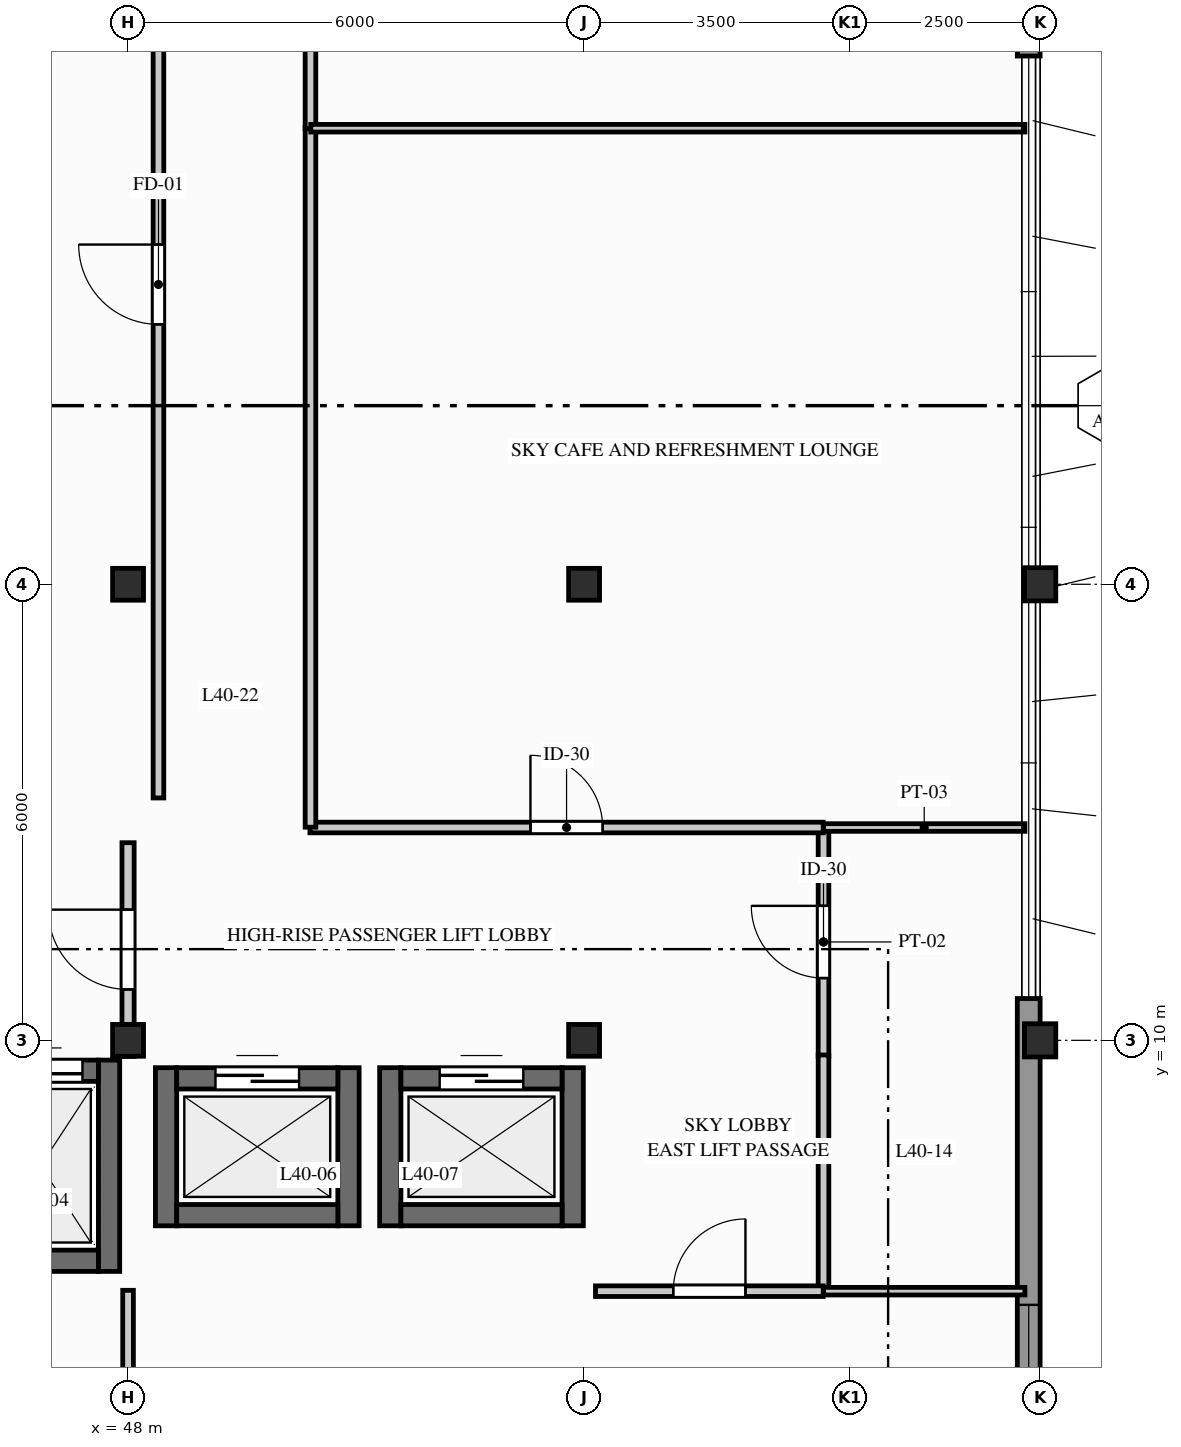
"""IFC4 building model, lengths in metres.
Left out: names, types, materials, properties, quantities, classifications, styles, units other than length and angle.
Written with IfcOpenShell. Run it as: python <this file> out.ifc"""

import sys

from ifc_helpers import new_model, si_unit, direction, frame, frame_2d, origin, origin_2d, place, context, subcontext, project, spatial, rectangle, i_section, extrude, element, fill, save


model = new_model("IFC4")
c1 = context("Model", 3, precision=1e-05, world=origin(), true_north=direction((0.0, 1.0)))
c2 = subcontext(c1, "Body", "Model", "MODEL_VIEW")
j1 = project(units=[si_unit("LENGTHUNIT", "METRE"), si_unit("PLANEANGLEUNIT", "RADIAN")], contexts=[c1])
p1 = place(None, origin())
s1 = spatial("IfcSite", under=j1, at=p1, CompositionType="ELEMENT")
p2 = place(p1, origin())
s2 = spatial("IfcBuilding", under=s1, at=p2, CompositionType="ELEMENT")
p3 = place(p2, frame((0.0, 0.0, 134.5)))
s3 = spatial("IfcBuildingStorey", under=s2, at=p3, CompositionType="ELEMENT", Elevation=134.5)
for number, where, z_axis, x_axis in (
    (1, (48.0, 10.0, 0.0), (0.0, 0.0, 1.0), (1.0, 0.0, 0.0)),
    (2, (48.0, 16.0, 0.0), (0.0, 0.0, 1.0), (1.0, 0.0, 0.0)),
    (3, (54.0, 10.0, 0.0), (0.0, 0.0, 1.0), (1.0, 0.0, 0.0)),
    (4, (54.0, 16.0, 0.0), (0.0, 0.0, 1.0), (1.0, 0.0, 0.0)),
):
    element("IfcColumn", number, at=place(p3, frame(where, z_axis=z_axis, x_axis=x_axis)), inside=s3, PredefinedType="COLUMN", context=c2, shape_type="SweptSolid", body=[
        extrude(i_section(OverallWidth=0.407, OverallDepth=0.419, WebThickness=0.031, FlangeThickness=0.049, FilletRadius=0.015, at=origin_2d()), origin(), (0.0, 0.0, 1.0), 4.2),
    ])
for number, where, z_axis, x_axis in (
    (5, (60.0, 10.0, 0.0), (0.0, 0.0, 1.0), (1.0, 0.0, 0.0)),
    (6, (60.0, 16.0, 0.0), (0.0, 0.0, 1.0), (1.0, 0.0, 0.0)),
):
    element("IfcColumn", number, at=place(p3, frame(where, z_axis=z_axis, x_axis=x_axis)), inside=s3, PredefinedType="COLUMN", context=c2, shape_type="SweptSolid", body=[
        extrude(i_section(OverallWidth=0.412, OverallDepth=0.437, WebThickness=0.036, FlangeThickness=0.058, FilletRadius=0.015, at=origin_2d()), origin(), (0.0, 0.0, 1.0), 4.2),
    ])
p4 = place(p3, frame((59.85, 2.5, 0.0), z_axis=(0.0, 0.0, 1.0), x_axis=(0.0, 1.0, 0.0)))
e7 = element("IfcWall", 7, at=p4, inside=s3, PredefinedType="STANDARD", context=c2, shape_type="SweptSolid", body=[
    extrude(rectangle(XDim=8.05, YDim=0.3, at=frame_2d((4.025, 0.0))), origin(), (0.0, 0.0, 1.0), 3.98),
])
p5 = place(p4, frame((2.52, 0.0, 0.95)))
e8 = element("IfcOpeningElement", 8, at=p5, cuts=e7, PredefinedType="OPENING", context=c2, shape_type="SweptSolid", body=[
    extrude(rectangle(XDim=1.5, YDim=1.8, at=frame_2d((0.75, 0.9))), frame((0.0, 0.16, 0.0), z_axis=(0.0, -1.0, 0.0), x_axis=(1.0, 0.0, 0.0)), (0.0, 0.0, 1.0), 0.32),
])
p6 = place(p3, frame((59.85, 22.95, 0.0), z_axis=(0.0, 0.0, 1.0), x_axis=(0.0, 1.0, 0.0)))
e9 = element("IfcWall", 9, at=p6, inside=s3, PredefinedType="STANDARD", context=c2, shape_type="SweptSolid", body=[
    extrude(rectangle(XDim=5.55, YDim=0.3, at=frame_2d((2.775, 0.0))), origin(), (0.0, 0.0, 1.0), 3.422),
])
p7 = place(p3, frame((47.75, 6.96, 0.0), z_axis=(0.0, 0.0, 1.0), x_axis=(0.0, 1.0, 0.0)))
e10 = element("IfcWall", 10, at=p7, inside=s3, PredefinedType="SHEAR", context=c2, shape_type="SweptSolid", body=[
    extrude(rectangle(XDim=2.78, YDim=0.28, at=frame_2d((1.39, 0.0))), origin(), (0.0, 0.0, 1.0), 3.98),
])
p8 = place(p3, frame((46.09, 7.1, 0.0), z_axis=(0.0, 0.0, 1.0), x_axis=(1.0, 0.0, 0.0)))
e11 = element("IfcWall", 11, at=p8, inside=s3, PredefinedType="SHEAR", context=c2, shape_type="SweptSolid", body=[
    extrude(rectangle(XDim=1.52, YDim=0.28, at=frame_2d((0.76, 0.0))), origin(), (0.0, 0.0, 1.0), 3.98),
])
p9 = place(p3, frame((46.09, 9.6, 0.0), z_axis=(0.0, 0.0, 1.0), x_axis=(1.0, 0.0, 0.0)))
e12 = element("IfcWall", 12, at=p9, inside=s3, PredefinedType="SHEAR", context=c2, shape_type="SweptSolid", body=[
    extrude(rectangle(XDim=1.52, YDim=0.28, at=frame_2d((0.76, 0.0))), origin(), (0.0, 0.0, 1.0), 3.98),
])
p10 = place(p9, frame((0.21, 0.0, 0.0)))
e13 = element("IfcOpeningElement", 13, at=p10, cuts=e12, PredefinedType="OPENING", context=c2, shape_type="SweptSolid", body=[
    extrude(rectangle(XDim=1.1, YDim=2.06, at=frame_2d((0.55, 1.03))), frame((0.0, 0.15, 0.0), z_axis=(0.0, -1.0, 0.0), x_axis=(1.0, 0.0, 0.0)), (0.0, 0.0, 1.0), 0.3),
])
for number, where, z_axis, x_axis in (
    (14, (48.5, 7.56, 0.0), (0.0, 0.0, 1.0), (0.0, 1.0, 0.0)),
    (15, (50.9, 7.56, 0.0), (0.0, 0.0, 1.0), (0.0, 1.0, 0.0)),
):
    element("IfcWall", number, at=place(p3, frame(where, z_axis=z_axis, x_axis=x_axis)), inside=s3, PredefinedType="SHEAR", context=c2, shape_type="SweptSolid", body=[
        extrude(rectangle(XDim=2.08, YDim=0.28, at=frame_2d((1.04, 0.0))), origin(), (0.0, 0.0, 1.0), 3.98),
    ])
p11 = place(p3, frame((48.64, 7.7, 0.0), z_axis=(0.0, 0.0, 1.0), x_axis=(1.0, 0.0, 0.0)))
e16 = element("IfcWall", 16, at=p11, inside=s3, PredefinedType="SHEAR", context=c2, shape_type="SweptSolid", body=[
    extrude(rectangle(XDim=2.12, YDim=0.28, at=frame_2d((1.06, 0.0))), origin(), (0.0, 0.0, 1.0), 3.98),
])
p12 = place(p3, frame((48.64, 9.5, 0.0), z_axis=(0.0, 0.0, 1.0), x_axis=(1.0, 0.0, 0.0)))
e17 = element("IfcWall", 17, at=p12, inside=s3, PredefinedType="SHEAR", context=c2, shape_type="SweptSolid", body=[
    extrude(rectangle(XDim=2.12, YDim=0.28, at=frame_2d((1.06, 0.0))), origin(), (0.0, 0.0, 1.0), 3.98),
])
p13 = place(p12, frame((0.51, 0.0, 0.0)))
e18 = element("IfcOpeningElement", 18, at=p13, cuts=e17, PredefinedType="OPENING", context=c2, shape_type="SweptSolid", body=[
    extrude(rectangle(XDim=1.1, YDim=2.06, at=frame_2d((0.55, 1.03))), frame((0.0, 0.15, 0.0), z_axis=(0.0, -1.0, 0.0), x_axis=(1.0, 0.0, 0.0)), (0.0, 0.0, 1.0), 0.3),
])
for number, where, z_axis, x_axis in (
    (19, (51.45, 7.56, 0.0), (0.0, 0.0, 1.0), (0.0, 1.0, 0.0)),
    (20, (53.85, 7.56, 0.0), (0.0, 0.0, 1.0), (0.0, 1.0, 0.0)),
):
    element("IfcWall", number, at=place(p3, frame(where, z_axis=z_axis, x_axis=x_axis)), inside=s3, PredefinedType="SHEAR", context=c2, shape_type="SweptSolid", body=[
        extrude(rectangle(XDim=2.08, YDim=0.28, at=frame_2d((1.04, 0.0))), origin(), (0.0, 0.0, 1.0), 3.98),
    ])
p14 = place(p3, frame((51.59, 7.7, 0.0), z_axis=(0.0, 0.0, 1.0), x_axis=(1.0, 0.0, 0.0)))
e21 = element("IfcWall", 21, at=p14, inside=s3, PredefinedType="SHEAR", context=c2, shape_type="SweptSolid", body=[
    extrude(rectangle(XDim=2.12, YDim=0.28, at=frame_2d((1.06, 0.0))), origin(), (0.0, 0.0, 1.0), 3.98),
])
p15 = place(p3, frame((51.59, 9.5, 0.0), z_axis=(0.0, 0.0, 1.0), x_axis=(1.0, 0.0, 0.0)))
e22 = element("IfcWall", 22, at=p15, inside=s3, PredefinedType="SHEAR", context=c2, shape_type="SweptSolid", body=[
    extrude(rectangle(XDim=2.12, YDim=0.28, at=frame_2d((1.06, 0.0))), origin(), (0.0, 0.0, 1.0), 3.98),
])
p16 = place(p15, frame((0.51, 0.0, 0.0)))
e23 = element("IfcOpeningElement", 23, at=p16, cuts=e22, PredefinedType="OPENING", context=c2, shape_type="SweptSolid", body=[
    extrude(rectangle(XDim=1.1, YDim=2.06, at=frame_2d((0.55, 1.03))), frame((0.0, 0.15, 0.0), z_axis=(0.0, -1.0, 0.0), x_axis=(1.0, 0.0, 0.0)), (0.0, 0.0, 1.0), 0.3),
])
p17 = place(p3, frame((48.0, 3.15, 0.0), z_axis=(0.0, 0.0, 1.0), x_axis=(0.0, 1.0, 0.0)))
e24 = element("IfcWall", 24, at=p17, inside=s3, PredefinedType="PARTITIONING", context=c2, shape_type="SweptSolid", body=[
    extrude(rectangle(XDim=3.561, YDim=0.14, at=frame_2d((1.781, 0.0))), origin(), (0.0, 0.0, 1.0), 3.343),
])
p18 = place(p17, frame((1.371, 0.0, 0.0)))
e25 = element("IfcOpeningElement", 25, at=p18, cuts=e24, PredefinedType="OPENING", context=c2, shape_type="SweptSolid", body=[
    extrude(rectangle(XDim=0.82, YDim=2.02, at=frame_2d((0.41, 1.01))), frame((0.0, 0.08, 0.0), z_axis=(0.0, -1.0, 0.0), x_axis=(1.0, 0.0, 0.0)), (0.0, 0.0, 1.0), 0.16),
])
p19 = place(p3, frame((57.15, 9.789, 0.0), z_axis=(0.0, 0.0, 1.0), x_axis=(0.0, 1.0, 0.0)))
e26 = element("IfcWall", 26, at=p19, inside=s3, PredefinedType="PARTITIONING", context=c2, shape_type="SweptSolid", body=[
    extrude(rectangle(XDim=3.011, YDim=0.14, at=frame_2d((1.506, 0.0))), origin(), (0.0, 0.0, 1.0), 3.343),
])
p20 = place(p19, frame((1.031, 0.0, 0.0)))
e27 = element("IfcOpeningElement", 27, at=p20, cuts=e26, PredefinedType="OPENING", context=c2, shape_type="SweptSolid", body=[
    extrude(rectangle(XDim=0.95, YDim=2.05, at=frame_2d((0.475, 1.025))), frame((0.0, 0.08, 0.0), z_axis=(0.0, -1.0, 0.0), x_axis=(1.0, 0.0, 0.0)), (0.0, 0.0, 1.0), 0.16),
])
p21 = place(p3, frame((57.15, 12.8, 0.0), z_axis=(0.0, 0.0, 1.0), x_axis=(1.0, 0.0, 0.0)))
e28 = element("IfcWall", 28, at=p21, inside=s3, PredefinedType="PARTITIONING", context=c2, shape_type="SweptSolid", body=[
    extrude(rectangle(XDim=2.65, YDim=0.1, at=frame_2d((1.325, 0.0))), origin(), (0.0, 0.0, 1.0), 3.98),
])
p22 = place(p3, frame((57.15, 6.7, 0.0), z_axis=(0.0, 0.0, 1.0), x_axis=(0.0, 1.0, 0.0)))
e29 = element("IfcWall", 29, at=p22, inside=s3, PredefinedType="PARTITIONING", context=c2, shape_type="SweptSolid", body=[
    extrude(rectangle(XDim=3.107, YDim=0.14, at=frame_2d((1.554, 0.0))), origin(), (0.0, 0.0, 1.0), 3.98),
])
p23 = place(p3, frame((57.15, 6.7, 0.0), z_axis=(0.0, 0.0, 1.0), x_axis=(1.0, 0.0, 0.0)))
e30 = element("IfcWall", 30, at=p23, inside=s3, PredefinedType="PARTITIONING", context=c2, shape_type="SweptSolid", body=[
    extrude(rectangle(XDim=2.65, YDim=0.1, at=frame_2d((1.325, 0.0))), origin(), (0.0, 0.0, 1.0), 3.98),
])
p24 = place(p3, frame((48.0, 9.789, 0.0), z_axis=(0.0, 0.0, 1.0), x_axis=(0.0, 1.0, 0.0)))
e31 = element("IfcWall", 31, at=p24, inside=s3, PredefinedType="PARTITIONING", context=c2, shape_type="SweptSolid", body=[
    extrude(rectangle(XDim=2.811, YDim=0.16, at=frame_2d((1.406, 0.0))), origin(), (0.0, 0.0, 1.0), 3.343),
])
p25 = place(p24, frame((0.881, 0.0, 0.0)))
e32 = element("IfcOpeningElement", 32, at=p25, cuts=e31, PredefinedType="OPENING", context=c2, shape_type="SweptSolid", body=[
    extrude(rectangle(XDim=1.05, YDim=2.06, at=frame_2d((0.525, 1.03))), frame((0.0, 0.09, 0.0), z_axis=(0.0, -1.0, 0.0), x_axis=(1.0, 0.0, 0.0)), (0.0, 0.0, 1.0), 0.18),
])
p26 = place(p3, frame((50.393, 12.8, 0.0), z_axis=(0.0, 0.0, 1.0), x_axis=(1.0, 0.0, 0.0)))
e33 = element("IfcWall", 33, at=p26, inside=s3, PredefinedType="PARTITIONING", context=c2, shape_type="SweptSolid", body=[
    extrude(rectangle(XDim=6.753, YDim=0.14, at=frame_2d((3.377, 0.0))), origin(), (0.0, 0.0, 1.0), 3.343),
])
p27 = place(p26, frame((2.902, 0.0, 0.0)))
e34 = element("IfcOpeningElement", 34, at=p27, cuts=e33, PredefinedType="OPENING", context=c2, shape_type="SweptSolid", body=[
    extrude(rectangle(XDim=0.95, YDim=2.05, at=frame_2d((0.475, 1.025))), frame((0.0, 0.08, 0.0), z_axis=(0.0, -1.0, 0.0), x_axis=(1.0, 0.0, 0.0)), (0.0, 0.0, 1.0), 0.16),
])
p28 = place(p3, frame((48.4, 13.189, 0.0), z_axis=(0.0, 0.0, 1.0), x_axis=(0.0, 1.0, 0.0)))
e35 = element("IfcWall", 35, at=p28, inside=s3, PredefinedType="PARTITIONING", context=c2, shape_type="SweptSolid", body=[
    extrude(rectangle(XDim=13.511, YDim=0.14, at=frame_2d((6.756, 0.0))), origin(), (0.0, 0.0, 1.0), 3.343),
])
p29 = place(p28, frame((6.231, 0.0, 0.0)))
e36 = element("IfcOpeningElement", 36, at=p29, cuts=e35, PredefinedType="OPENING", context=c2, shape_type="SweptSolid", body=[
    extrude(rectangle(XDim=1.05, YDim=2.06, at=frame_2d((0.525, 1.03))), frame((0.0, 0.08, 0.0), z_axis=(0.0, -1.0, 0.0), x_axis=(1.0, 0.0, 0.0)), (0.0, 0.0, 1.0), 0.16),
])
p30 = place(p3, frame((50.4, 12.804, 0.0), z_axis=(0.0, 0.0, 1.0), x_axis=(0.0, 1.0, 0.0)))
e37 = element("IfcWall", 37, at=p30, inside=s3, PredefinedType="PARTITIONING", context=c2, shape_type="SweptSolid", body=[
    extrude(rectangle(XDim=9.207, YDim=0.14, at=frame_2d((4.604, 0.0))), origin(), (0.0, 0.0, 1.0), 3.343),
])
p31 = place(p3, frame((50.4, 21.993, 0.0), z_axis=(0.0, 0.0, 1.0), x_axis=(0.0, 1.0, 0.0)))
e38 = element("IfcWall", 38, at=p31, inside=s3, PredefinedType="PARTITIONING", context=c2, shape_type="SweptSolid", body=[
    extrude(rectangle(XDim=4.707, YDim=0.14, at=frame_2d((2.354, 0.0))), origin(), (0.0, 0.0, 1.0), 3.343),
])
p32 = place(p31, frame((1.879, 0.0, 0.0)))
e39 = element("IfcOpeningElement", 39, at=p32, cuts=e38, PredefinedType="OPENING", context=c2, shape_type="SweptSolid", body=[
    extrude(rectangle(XDim=0.95, YDim=2.05, at=frame_2d((0.475, 1.025))), frame((0.0, 0.08, 0.0), z_axis=(0.0, -1.0, 0.0), x_axis=(1.0, 0.0, 0.0)), (0.0, 0.0, 1.0), 0.16),
])
p33 = place(p3, frame((50.404, 22.0, 0.0), z_axis=(0.0, 0.0, 1.0), x_axis=(1.0, 0.0, 0.0)))
e40 = element("IfcWall", 40, at=p33, inside=s3, PredefinedType="PARTITIONING", context=c2, shape_type="SweptSolid", body=[
    extrude(rectangle(XDim=9.396, YDim=0.1, at=frame_2d((4.698, 0.0))), origin(), (0.0, 0.0, 1.0), 3.343),
])
p34 = place(p3, frame((54.15, 6.7, 0.0), z_axis=(0.0, 0.0, 1.0), x_axis=(1.0, 0.0, 0.0)))
e41 = element("IfcWall", 41, at=p34, inside=s3, PredefinedType="PARTITIONING", context=c2, shape_type="SweptSolid", body=[
    extrude(rectangle(XDim=2.996, YDim=0.14, at=frame_2d((1.498, 0.0))), origin(), (0.0, 0.0, 1.0), 3.98),
])
p35 = place(p34, frame((1.023, 0.0, 0.0)))
e42 = element("IfcOpeningElement", 42, at=p35, cuts=e41, PredefinedType="OPENING", context=c2, shape_type="SweptSolid", body=[
    extrude(rectangle(XDim=0.95, YDim=2.05, at=frame_2d((0.475, 1.025))), frame((0.0, 0.08, 0.0), z_axis=(0.0, -1.0, 0.0), x_axis=(1.0, 0.0, 0.0)), (0.0, 0.0, 1.0), 0.16),
])
p36 = place(p5, origin())
e43 = element("IfcWindow", 43, at=p36, inside=s3, PartitioningType="SINGLE_PANEL", PredefinedType="WINDOW", context=c2, shape_type="SweptSolid", body=[
    extrude(rectangle(XDim=1.5, YDim=1.8, at=frame_2d((0.75, 0.9))), frame((0.0, 0.03, 0.0), z_axis=(0.0, -1.0, 0.0), x_axis=(1.0, 0.0, 0.0)), (0.0, 0.0, 1.0), 0.06),
])
fill(e8, e43)
p37 = place(p10, origin())
e44 = element("IfcDoor", 44, at=p37, inside=s3, OperationType="SLIDING_TO_LEFT", PredefinedType="DOOR", context=c2, shape_type="SweptSolid", body=[
    extrude(rectangle(XDim=1.1, YDim=2.06, at=frame_2d((0.55, 1.03))), frame((0.0, 0.025, 0.0), z_axis=(0.0, -1.0, 0.0), x_axis=(1.0, 0.0, 0.0)), (0.0, 0.0, 1.0), 0.05),
])
fill(e13, e44)
p38 = place(p13, origin())
e45 = element("IfcDoor", 45, at=p38, inside=s3, OperationType="SLIDING_TO_LEFT", PredefinedType="DOOR", context=c2, shape_type="SweptSolid", body=[
    extrude(rectangle(XDim=1.1, YDim=2.06, at=frame_2d((0.55, 1.03))), frame((0.0, 0.025, 0.0), z_axis=(0.0, -1.0, 0.0), x_axis=(1.0, 0.0, 0.0)), (0.0, 0.0, 1.0), 0.05),
])
fill(e18, e45)
p39 = place(p16, origin())
e46 = element("IfcDoor", 46, at=p39, inside=s3, OperationType="SLIDING_TO_RIGHT", PredefinedType="DOOR", context=c2, shape_type="SweptSolid", body=[
    extrude(rectangle(XDim=1.1, YDim=2.06, at=frame_2d((0.55, 1.03))), frame((0.0, 0.025, 0.0), z_axis=(0.0, -1.0, 0.0), x_axis=(1.0, 0.0, 0.0)), (0.0, 0.0, 1.0), 0.05),
])
fill(e23, e46)
p40 = place(p20, origin())
e47 = element("IfcDoor", 47, at=p40, inside=s3, OperationType="SINGLE_SWING_RIGHT", PredefinedType="DOOR", context=c2, shape_type="SweptSolid", body=[
    extrude(rectangle(XDim=0.95, YDim=2.05, at=frame_2d((0.475, 1.025))), frame((0.0, 0.025, 0.0), z_axis=(0.0, -1.0, 0.0), x_axis=(1.0, 0.0, 0.0)), (0.0, 0.0, 1.0), 0.05),
])
fill(e27, e47)
p41 = place(p25, origin())
e48 = element("IfcDoor", 48, at=p41, inside=s3, OperationType="SINGLE_SWING_RIGHT", PredefinedType="DOOR", context=c2, shape_type="SweptSolid", body=[
    extrude(rectangle(XDim=1.05, YDim=2.06, at=frame_2d((0.525, 1.03))), frame((0.0, 0.025, 0.0), z_axis=(0.0, -1.0, 0.0), x_axis=(1.0, 0.0, 0.0)), (0.0, 0.0, 1.0), 0.05),
])
fill(e32, e48)
p42 = place(p27, origin())
e49 = element("IfcDoor", 49, at=p42, inside=s3, OperationType="SINGLE_SWING_LEFT", PredefinedType="DOOR", context=c2, shape_type="SweptSolid", body=[
    extrude(rectangle(XDim=0.95, YDim=2.05, at=frame_2d((0.475, 1.025))), frame((0.0, 0.025, 0.0), z_axis=(0.0, -1.0, 0.0), x_axis=(1.0, 0.0, 0.0)), (0.0, 0.0, 1.0), 0.05),
])
fill(e34, e49)
p43 = place(p29, origin())
e50 = element("IfcDoor", 50, at=p43, inside=s3, OperationType="SINGLE_SWING_RIGHT", PredefinedType="DOOR", context=c2, shape_type="SweptSolid", body=[
    extrude(rectangle(XDim=1.05, YDim=2.06, at=frame_2d((0.525, 1.03))), frame((0.0, 0.025, 0.0), z_axis=(0.0, -1.0, 0.0), x_axis=(1.0, 0.0, 0.0)), (0.0, 0.0, 1.0), 0.05),
])
fill(e36, e50)
p44 = place(p35, origin())
e51 = element("IfcDoor", 51, at=p44, inside=s3, OperationType="SINGLE_SWING_RIGHT", PredefinedType="DOOR", context=c2, shape_type="SweptSolid", body=[
    extrude(rectangle(XDim=0.95, YDim=2.05, at=frame_2d((0.475, 1.025))), frame((0.0, 0.025, 0.0), z_axis=(0.0, -1.0, 0.0), x_axis=(1.0, 0.0, 0.0)), (0.0, 0.0, 1.0), 0.05),
])
fill(e42, e51)
save(model, sys.argv[1])
